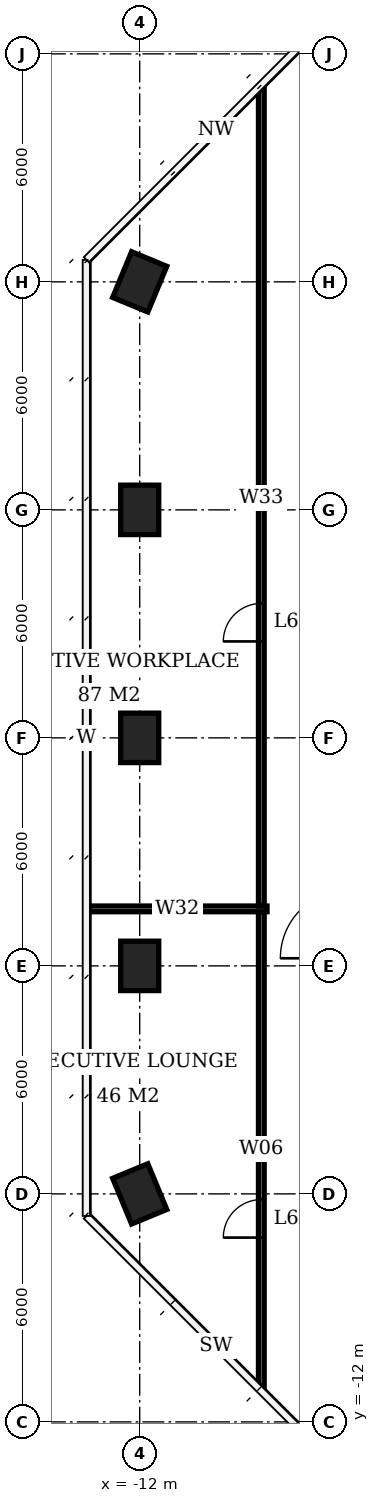
"""IFC4 building model, lengths in metres.
Left out: names, types, materials, properties, quantities, classifications, styles, units other than length and angle.
Written with IfcOpenShell. Run it as: python <this file> out.ifc"""

import sys

from ifc_helpers import new_model, si_unit, direction, frame, frame_2d, origin, origin_2d, place, context, subcontext, project, spatial, rectangle, extrude, element, fill, save


model = new_model("IFC4")
c1 = context("Model", 3, precision=1e-05, world=origin(), true_north=direction((0.0, 1.0)))
c2 = subcontext(c1, "Body", "Model", "MODEL_VIEW")
j1 = project(units=[si_unit("LENGTHUNIT", "METRE"), si_unit("PLANEANGLEUNIT", "RADIAN")], contexts=[c1])
p1 = place(None, origin())
s1 = spatial("IfcSite", under=j1, at=p1, CompositionType="ELEMENT")
p2 = place(p1, origin())
s2 = spatial("IfcBuilding", under=s1, at=p2, CompositionType="ELEMENT")
p3 = place(p2, frame((0.0, 0.0, 264.5)))
s3 = spatial("IfcBuildingStorey", under=s2, at=p3, CompositionType="ELEMENT", Elevation=264.5)
for number, where, z_axis, x_axis in (
    (1, (-12.0, -6.0, 0.0), (0.0, 0.0, 1.0), (-0.383, 0.924, 0.0)),
    (2, (-12.0, 0.0, 0.0), (0.0, 0.0, 1.0), (0.0, 1.0, 0.0)),
    (3, (-12.0, 6.0, 0.0), (0.0, 0.0, 1.0), (0.0, 1.0, 0.0)),
    (4, (-12.0, 12.0, 0.0), (0.0, 0.0, 1.0), (0.0, 1.0, 0.0)),
    (5, (-12.0, 18.0, 0.0), (0.0, 0.0, 1.0), (0.383, 0.924, 0.0)),
):
    element("IfcColumn", number, at=place(p3, frame(where, z_axis=z_axis, x_axis=x_axis)), inside=s3, PredefinedType="COLUMN", context=c2, shape_type="SweptSolid", body=[
        extrude(rectangle(XDim=1.3, YDim=1.0, at=origin_2d()), origin(), (0.0, 0.0, 1.0), 3.9),
    ])
p4 = place(p3, frame((-13.375, 1.5, 0.0), z_axis=(0.0, 0.0, 1.0), x_axis=(1.0, 0.0, 0.0)))
e6 = element("IfcWall", 6, at=p4, inside=s3, PredefinedType="PARTITIONING", context=c2, shape_type="SweptSolid", body=[
    extrude(rectangle(XDim=4.725, YDim=0.15, at=frame_2d((2.363, 0.0))), origin(), (0.0, 0.0, 1.0), 3.65),
])
p5 = place(p3, frame((-8.8, -11.063, 0.0), z_axis=(0.0, 0.0, 1.0), x_axis=(0.0, 1.0, 0.0)))
e7 = element("IfcWall", 7, at=p5, inside=s3, PredefinedType="PARTITIONING", context=c2, shape_type="SweptSolid", body=[
    extrude(rectangle(XDim=12.488, YDim=0.15, at=frame_2d((6.244, 0.0))), origin(), (0.0, 0.0, 1.0), 3.65),
])
p6 = place(p5, frame((3.913, 0.0, 0.0)))
e8 = element("IfcOpeningElement", 8, at=p6, cuts=e7, PredefinedType="OPENING", context=c2, shape_type="SweptSolid", body=[
    extrude(rectangle(XDim=1.0, YDim=2.4, at=frame_2d((0.5, 1.2))), frame((0.0, 0.085, 0.0), z_axis=(0.0, -1.0, 0.0), x_axis=(1.0, 0.0, 0.0)), (0.0, 0.0, 1.0), 0.17),
])
p7 = place(p3, frame((-8.8, 1.575, 0.0), z_axis=(0.0, 0.0, 1.0), x_axis=(0.0, 1.0, 0.0)))
e9 = element("IfcWall", 9, at=p7, inside=s3, PredefinedType="PARTITIONING", context=c2, shape_type="SweptSolid", body=[
    extrude(rectangle(XDim=21.488, YDim=0.15, at=frame_2d((10.744, 0.0))), origin(), (0.0, 0.0, 1.0), 3.65),
])
p8 = place(p7, frame((6.963, 0.0, 0.0)))
e10 = element("IfcOpeningElement", 10, at=p8, cuts=e9, PredefinedType="OPENING", context=c2, shape_type="SweptSolid", body=[
    extrude(rectangle(XDim=1.0, YDim=2.4, at=frame_2d((0.5, 1.2))), frame((0.0, 0.085, 0.0), z_axis=(0.0, -1.0, 0.0), x_axis=(1.0, 0.0, 0.0)), (0.0, 0.0, 1.0), 0.17),
])
p9 = place(p6, origin())
e11 = element("IfcDoor", 11, at=p9, inside=s3, OperationType="SINGLE_SWING_LEFT", PredefinedType="DOOR", context=c2, shape_type="SweptSolid", body=[
    extrude(rectangle(XDim=1.0, YDim=2.4, at=frame_2d((0.5, 1.2))), frame((0.0, 0.025, 0.0), z_axis=(0.0, -1.0, 0.0), x_axis=(1.0, 0.0, 0.0)), (0.0, 0.0, 1.0), 0.05),
])
fill(e8, e11)
p10 = place(p8, origin())
e12 = element("IfcDoor", 12, at=p10, inside=s3, OperationType="SINGLE_SWING_LEFT", PredefinedType="DOOR", context=c2, shape_type="SweptSolid", body=[
    extrude(rectangle(XDim=1.0, YDim=2.4, at=frame_2d((0.5, 1.2))), frame((0.0, 0.025, 0.0), z_axis=(0.0, -1.0, 0.0), x_axis=(1.0, 0.0, 0.0)), (0.0, 0.0, 1.0), 0.05),
])
fill(e10, e12)
save(model, sys.argv[1])
